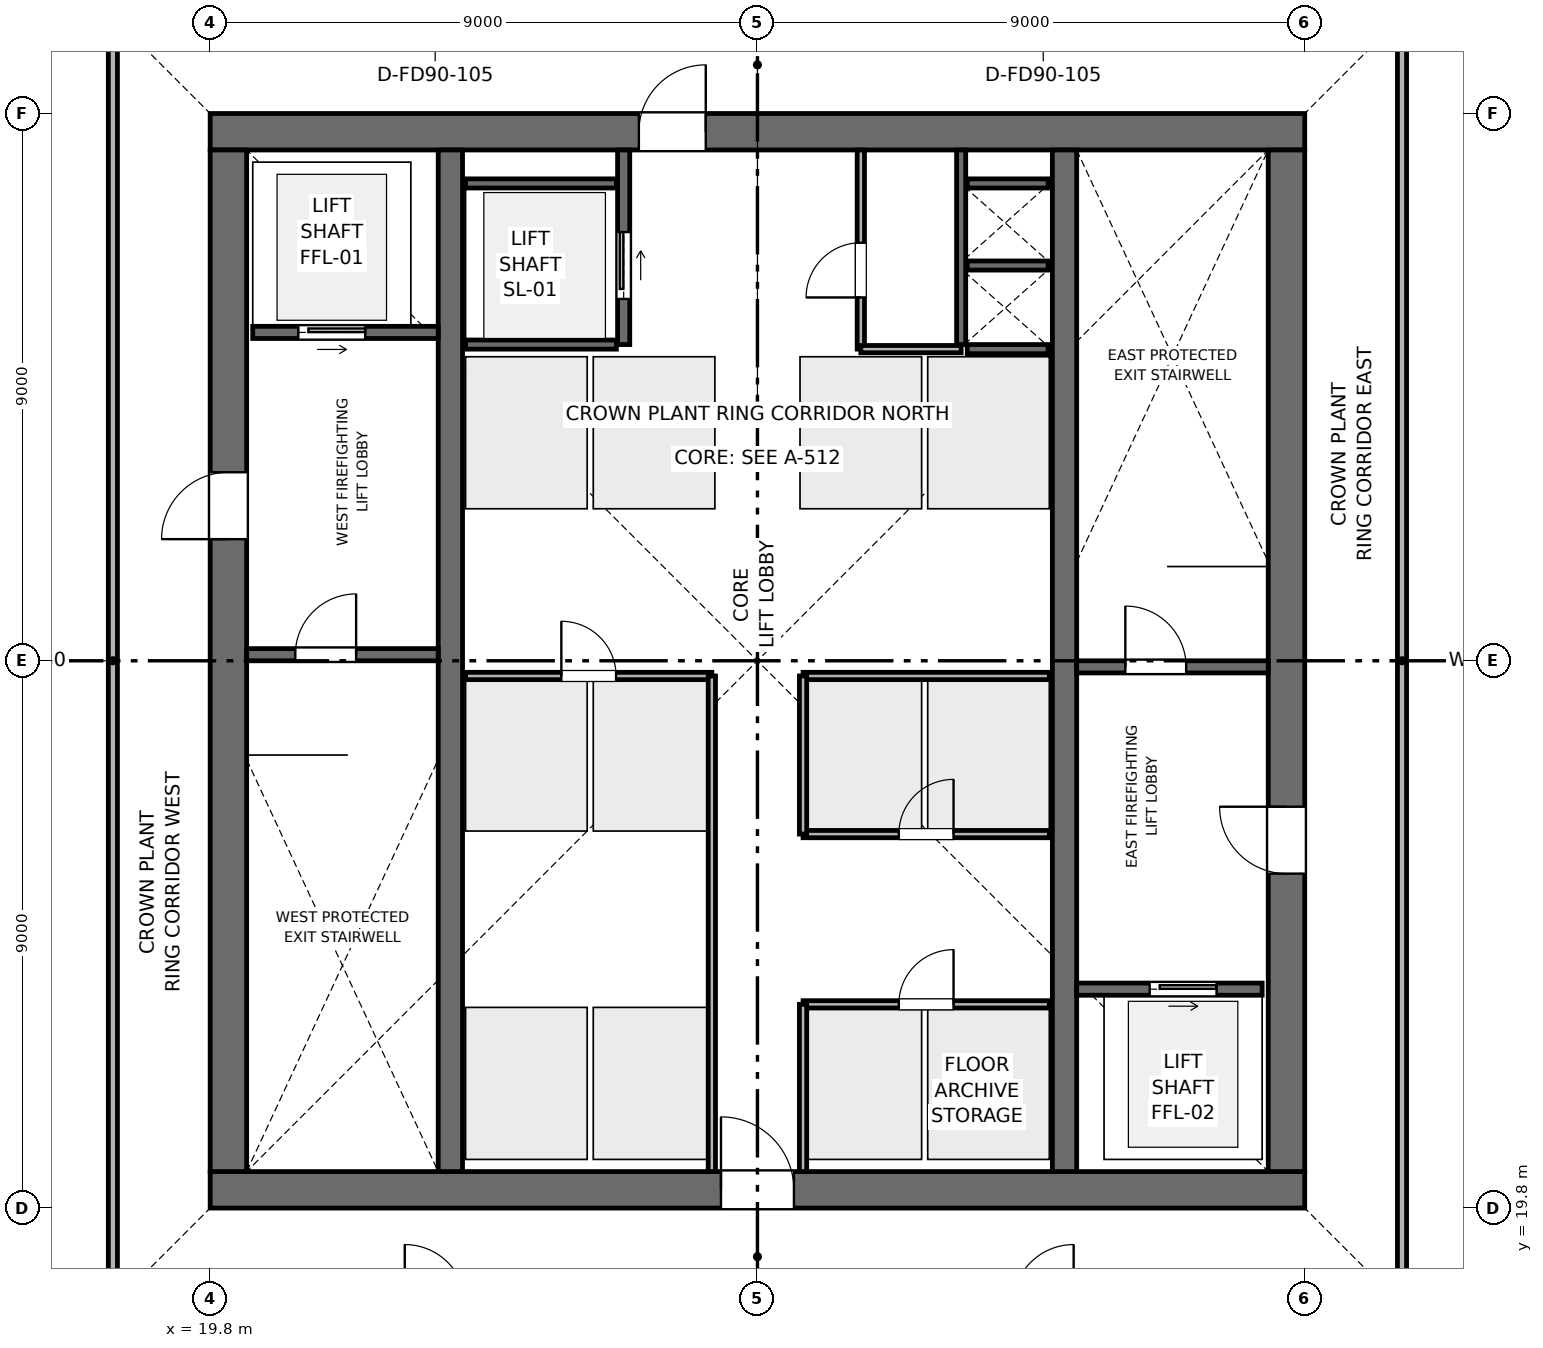
"""IFC4 building model, lengths in metres.
Left out: names, types, materials, properties, quantities, classifications, styles, units other than length and angle.
Written with IfcOpenShell. Run it as: python <this file> out.ifc"""

import sys

from ifc_helpers import new_model, si_unit, direction, frame, frame_2d, origin, place, context, subcontext, project, spatial, rectangle, extrude, element, fill, save


model = new_model("IFC4")
c1 = context("Model", 3, precision=1e-05, world=origin(), true_north=direction((0.0, 1.0)))
c2 = subcontext(c1, "Body", "Model", "MODEL_VIEW")
j1 = project(units=[si_unit("LENGTHUNIT", "METRE"), si_unit("PLANEANGLEUNIT", "RADIAN")], contexts=[c1])
p1 = place(None, origin())
s1 = spatial("IfcSite", under=j1, at=p1, CompositionType="ELEMENT")
p2 = place(p1, origin())
s2 = spatial("IfcBuilding", under=s1, at=p2, CompositionType="ELEMENT")
p3 = place(p2, frame((0.0, 0.0, 373.8)))
s3 = spatial("IfcBuildingStorey", under=s2, at=p3, CompositionType="ELEMENT", Elevation=373.8)
p4 = place(p3, frame((19.8, 20.1, 0.0), z_axis=(0.0, 0.0, 1.0), x_axis=(1.0, 0.0, 0.0)))
e1 = element("IfcWall", 1, at=p4, inside=s3, PredefinedType="SHEAR", context=c2, shape_type="SweptSolid", body=[
    extrude(rectangle(XDim=18.0, YDim=0.6, at=frame_2d((9.0, 0.0))), origin(), (0.0, 0.0, 1.0), 4.8),
])
p5 = place(p4, frame((8.4, 0.0, 0.0)))
e2 = element("IfcOpeningElement", 2, at=p5, cuts=e1, PredefinedType="OPENING", context=c2, shape_type="SweptSolid", body=[
    extrude(rectangle(XDim=1.2, YDim=2.2, at=frame_2d((0.6, 1.1))), frame((0.0, 0.31, 0.0), z_axis=(0.0, -1.0, 0.0), x_axis=(1.0, 0.0, 0.0)), (0.0, 0.0, 1.0), 0.62),
])
p6 = place(p3, frame((19.8, 37.5, 0.0), z_axis=(0.0, 0.0, 1.0), x_axis=(1.0, 0.0, 0.0)))
e3 = element("IfcWall", 3, at=p6, inside=s3, PredefinedType="SHEAR", context=c2, shape_type="SweptSolid", body=[
    extrude(rectangle(XDim=18.0, YDim=0.6, at=frame_2d((9.0, 0.0))), origin(), (0.0, 0.0, 1.0), 4.8),
])
p7 = place(p6, frame((7.05, 0.0, 0.0)))
e4 = element("IfcOpeningElement", 4, at=p7, cuts=e3, PredefinedType="OPENING", context=c2, shape_type="SweptSolid", body=[
    extrude(rectangle(XDim=1.1, YDim=2.15, at=frame_2d((0.55, 1.075))), frame((0.0, 0.31, 0.0), z_axis=(0.0, -1.0, 0.0), x_axis=(1.0, 0.0, 0.0)), (0.0, 0.0, 1.0), 0.62),
])
p8 = place(p3, frame((20.1, 20.4, 0.0), z_axis=(0.0, 0.0, 1.0), x_axis=(0.0, 1.0, 0.0)))
e5 = element("IfcWall", 5, at=p8, inside=s3, PredefinedType="SHEAR", context=c2, shape_type="SweptSolid", body=[
    extrude(rectangle(XDim=16.8, YDim=0.6, at=frame_2d((8.4, 0.0))), origin(), (0.0, 0.0, 1.0), 4.8),
])
p9 = place(p8, frame((10.4, 0.0, 0.0)))
e6 = element("IfcOpeningElement", 6, at=p9, cuts=e5, PredefinedType="OPENING", context=c2, shape_type="SweptSolid", body=[
    extrude(rectangle(XDim=1.1, YDim=2.15, at=frame_2d((0.55, 1.075))), frame((0.0, 0.31, 0.0), z_axis=(0.0, -1.0, 0.0), x_axis=(1.0, 0.0, 0.0)), (0.0, 0.0, 1.0), 0.62),
])
p10 = place(p3, frame((37.5, 20.4, 0.0), z_axis=(0.0, 0.0, 1.0), x_axis=(0.0, 1.0, 0.0)))
e7 = element("IfcWall", 7, at=p10, inside=s3, PredefinedType="SHEAR", context=c2, shape_type="SweptSolid", body=[
    extrude(rectangle(XDim=16.8, YDim=0.6, at=frame_2d((8.4, 0.0))), origin(), (0.0, 0.0, 1.0), 4.8),
])
p11 = place(p10, frame((4.9, 0.0, 0.0)))
e8 = element("IfcOpeningElement", 8, at=p11, cuts=e7, PredefinedType="OPENING", context=c2, shape_type="SweptSolid", body=[
    extrude(rectangle(XDim=1.1, YDim=2.15, at=frame_2d((0.55, 1.075))), frame((0.0, 0.31, 0.0), z_axis=(0.0, -1.0, 0.0), x_axis=(1.0, 0.0, 0.0)), (0.0, 0.0, 1.0), 0.62),
])
for number, where, z_axis, x_axis in (
    (9, (23.75, 20.4, 0.0), (0.0, 0.0, 1.0), (0.0, 1.0, 0.0)),
    (10, (33.85, 20.4, 0.0), (0.0, 0.0, 1.0), (0.0, 1.0, 0.0)),
):
    element("IfcWall", number, at=place(p3, frame(where, z_axis=z_axis, x_axis=x_axis)), inside=s3, PredefinedType="SHEAR", context=c2, shape_type="SweptSolid", body=[
        extrude(rectangle(XDim=16.8, YDim=0.4, at=frame_2d((8.4, 0.0))), origin(), (0.0, 0.0, 1.0), 4.8),
    ])
p12 = place(p3, frame((20.4, 28.9, 0.0), z_axis=(0.0, 0.0, 1.0), x_axis=(1.0, 0.0, 0.0)))
e11 = element("IfcWall", 11, at=p12, inside=s3, PredefinedType="SHEAR", context=c2, shape_type="SweptSolid", body=[
    extrude(rectangle(XDim=3.15, YDim=0.2, at=frame_2d((1.575, 0.0))), origin(), (0.0, 0.0, 1.0), 4.5),
])
p13 = place(p12, frame((0.8, 0.0, 0.0)))
e12 = element("IfcOpeningElement", 12, at=p13, cuts=e11, PredefinedType="OPENING", context=c2, shape_type="SweptSolid", body=[
    extrude(rectangle(XDim=1.0, YDim=2.1, at=frame_2d((0.5, 1.05))), frame((0.0, 0.11, 0.0), z_axis=(0.0, -1.0, 0.0), x_axis=(1.0, 0.0, 0.0)), (0.0, 0.0, 1.0), 0.22),
])
p14 = place(p3, frame((34.05, 28.7, 0.0), z_axis=(0.0, 0.0, 1.0), x_axis=(1.0, 0.0, 0.0)))
e13 = element("IfcWall", 13, at=p14, inside=s3, PredefinedType="SHEAR", context=c2, shape_type="SweptSolid", body=[
    extrude(rectangle(XDim=3.15, YDim=0.2, at=frame_2d((1.575, 0.0))), origin(), (0.0, 0.0, 1.0), 4.5),
])
p15 = place(p14, frame((0.8, 0.0, 0.0)))
e14 = element("IfcOpeningElement", 14, at=p15, cuts=e13, PredefinedType="OPENING", context=c2, shape_type="SweptSolid", body=[
    extrude(rectangle(XDim=1.0, YDim=2.1, at=frame_2d((0.5, 1.05))), frame((0.0, 0.11, 0.0), z_axis=(0.0, -1.0, 0.0), x_axis=(1.0, 0.0, 0.0)), (0.0, 0.0, 1.0), 0.22),
])
p16 = place(p3, frame((32.15, 34.0, 0.0), z_axis=(0.0, 0.0, 1.0), x_axis=(0.0, 1.0, 0.0)))
e15 = element("IfcWall", 15, at=p16, inside=s3, PredefinedType="SHEAR", context=c2, shape_type="SweptSolid", body=[
    extrude(rectangle(XDim=3.2, YDim=0.15, at=frame_2d((1.6, 0.0))), origin(), (0.0, 0.0, 1.0), 4.5),
])
for number, where, z_axis, x_axis in (
    (16, (32.25, 33.925, 0.0), (0.0, 0.0, 1.0), (1.0, 0.0, 0.0)),
    (17, (32.25, 35.3, 0.0), (0.0, 0.0, 1.0), (1.0, 0.0, 0.0)),
):
    element("IfcWall", number, at=place(p3, frame(where, z_axis=z_axis, x_axis=x_axis)), inside=s3, PredefinedType="SHEAR", context=c2, shape_type="SweptSolid", body=[
        extrude(rectangle(XDim=1.33, YDim=0.15, at=frame_2d((0.665, 0.0))), origin(), (0.0, 0.0, 1.0), 4.5),
    ])
p17 = place(p3, frame((20.5, 34.2, 0.0), z_axis=(0.0, 0.0, 1.0), x_axis=(1.0, 0.0, 0.0)))
e18 = element("IfcWall", 18, at=p17, inside=s3, PredefinedType="SHEAR", context=c2, shape_type="SweptSolid", body=[
    extrude(rectangle(XDim=3.05, YDim=0.2, at=frame_2d((1.525, 0.0))), origin(), (0.0, 0.0, 1.0), 4.5),
])
p18 = place(p17, frame((0.75, 0.0, 0.0)))
e19 = element("IfcOpeningElement", 19, at=p18, cuts=e18, PredefinedType="OPENING", context=c2, shape_type="SweptSolid", body=[
    extrude(rectangle(XDim=1.1, YDim=2.15, at=frame_2d((0.55, 1.075))), frame((0.0, 0.11, 0.0), z_axis=(0.0, -1.0, 0.0), x_axis=(1.0, 0.0, 0.0)), (0.0, 0.0, 1.0), 0.22),
])
p19 = place(p3, frame((34.05, 23.4, 0.0), z_axis=(0.0, 0.0, 1.0), x_axis=(1.0, 0.0, 0.0)))
e20 = element("IfcWall", 20, at=p19, inside=s3, PredefinedType="SHEAR", context=c2, shape_type="SweptSolid", body=[
    extrude(rectangle(XDim=3.05, YDim=0.2, at=frame_2d((1.525, 0.0))), origin(), (0.0, 0.0, 1.0), 4.5),
])
p20 = place(p19, frame((1.2, 0.0, 0.0)))
e21 = element("IfcOpeningElement", 21, at=p20, cuts=e20, PredefinedType="OPENING", context=c2, shape_type="SweptSolid", body=[
    extrude(rectangle(XDim=1.1, YDim=2.15, at=frame_2d((0.55, 1.075))), frame((0.0, 0.11, 0.0), z_axis=(0.0, -1.0, 0.0), x_axis=(1.0, 0.0, 0.0)), (0.0, 0.0, 1.0), 0.22),
])
p21 = place(p3, frame((26.6, 34.0, 0.0), z_axis=(0.0, 0.0, 1.0), x_axis=(0.0, 1.0, 0.0)))
e22 = element("IfcWall", 22, at=p21, inside=s3, PredefinedType="SHEAR", context=c2, shape_type="SweptSolid", body=[
    extrude(rectangle(XDim=3.2, YDim=0.2, at=frame_2d((1.6, 0.0))), origin(), (0.0, 0.0, 1.0), 4.5),
])
p22 = place(p21, frame((0.75, 0.0, 0.0)))
e23 = element("IfcOpeningElement", 23, at=p22, cuts=e22, PredefinedType="OPENING", context=c2, shape_type="SweptSolid", body=[
    extrude(rectangle(XDim=1.1, YDim=2.15, at=frame_2d((0.55, 1.075))), frame((0.0, 0.11, 0.0), z_axis=(0.0, -1.0, 0.0), x_axis=(1.0, 0.0, 0.0)), (0.0, 0.0, 1.0), 0.22),
])
for number, where, z_axis, x_axis in (
    (24, (24.0, 34.0, 0.0), (0.0, 0.0, 1.0), (1.0, 0.0, 0.0)),
    (25, (24.0, 36.65, 0.0), (0.0, 0.0, 1.0), (1.0, 0.0, 0.0)),
):
    element("IfcWall", number, at=place(p3, frame(where, z_axis=z_axis, x_axis=x_axis)), inside=s3, PredefinedType="SHEAR", context=c2, shape_type="SweptSolid", body=[
        extrude(rectangle(XDim=2.48, YDim=0.15, at=frame_2d((1.24, 0.0))), origin(), (0.0, 0.0, 1.0), 4.5),
    ])
p23 = place(p3, frame((32.25, 36.65, 0.0), z_axis=(0.0, 0.0, 1.0), x_axis=(1.0, 0.0, 0.0)))
e26 = element("IfcWall", 26, at=p23, inside=s3, PredefinedType="SHEAR", context=c2, shape_type="SweptSolid", body=[
    extrude(rectangle(XDim=1.33, YDim=0.15, at=frame_2d((0.665, 0.0))), origin(), (0.0, 0.0, 1.0), 4.5),
])
p24 = place(p3, frame((30.5, 33.925, 0.0), z_axis=(0.0, 0.0, 1.0), x_axis=(0.0, 1.0, 0.0)))
e27 = element("IfcWall", 27, at=p24, inside=s3, PredefinedType="PARTITIONING", context=c2, shape_type="SweptSolid", body=[
    extrude(rectangle(XDim=3.275, YDim=0.12, at=frame_2d((1.637, 0.0))), origin(), (0.0, 0.0, 1.0), 4.5),
])
p25 = place(p24, frame((0.85, 0.0, 0.0)))
e28 = element("IfcOpeningElement", 28, at=p25, cuts=e27, PredefinedType="OPENING", context=c2, shape_type="SweptSolid", body=[
    extrude(rectangle(XDim=0.9, YDim=2.1, at=frame_2d((0.45, 1.05))), frame((0.0, 0.07, 0.0), z_axis=(0.0, -1.0, 0.0), x_axis=(1.0, 0.0, 0.0)), (0.0, 0.0, 1.0), 0.14),
])
p26 = place(p3, frame((30.5, 33.925, 0.0), z_axis=(0.0, 0.0, 1.0), x_axis=(1.0, 0.0, 0.0)))
e29 = element("IfcWall", 29, at=p26, inside=s3, PredefinedType="PARTITIONING", context=c2, shape_type="SweptSolid", body=[
    extrude(rectangle(XDim=1.65, YDim=0.12, at=frame_2d((0.825, 0.0))), origin(), (0.0, 0.0, 1.0), 4.5),
])
p27 = place(p3, frame((24.0, 28.55, 0.0), z_axis=(0.0, 0.0, 1.0), x_axis=(1.0, 0.0, 0.0)))
e30 = element("IfcWall", 30, at=p27, inside=s3, PredefinedType="PARTITIONING", context=c2, shape_type="SweptSolid", body=[
    extrude(rectangle(XDim=4.05, YDim=0.12, at=frame_2d((2.025, 0.0))), origin(), (0.0, 0.0, 1.0), 4.5),
])
p28 = place(p27, frame((1.575, 0.0, 0.0)))
e31 = element("IfcOpeningElement", 31, at=p28, cuts=e30, PredefinedType="OPENING", context=c2, shape_type="SweptSolid", body=[
    extrude(rectangle(XDim=0.9, YDim=2.1, at=frame_2d((0.45, 1.05))), frame((0.0, 0.07, 0.0), z_axis=(0.0, -1.0, 0.0), x_axis=(1.0, 0.0, 0.0)), (0.0, 0.0, 1.0), 0.14),
])
p29 = place(p3, frame((28.05, 20.4, 0.0), z_axis=(0.0, 0.0, 1.0), x_axis=(0.0, 1.0, 0.0)))
e32 = element("IfcWall", 32, at=p29, inside=s3, PredefinedType="PARTITIONING", context=c2, shape_type="SweptSolid", body=[
    extrude(rectangle(XDim=8.15, YDim=0.12, at=frame_2d((4.075, 0.0))), origin(), (0.0, 0.0, 1.0), 4.5),
])
p30 = place(p3, frame((29.55, 23.15, 0.0), z_axis=(0.0, 0.0, 1.0), x_axis=(1.0, 0.0, 0.0)))
e33 = element("IfcWall", 33, at=p30, inside=s3, PredefinedType="PARTITIONING", context=c2, shape_type="SweptSolid", body=[
    extrude(rectangle(XDim=4.05, YDim=0.12, at=frame_2d((2.025, 0.0))), origin(), (0.0, 0.0, 1.0), 4.5),
])
p31 = place(p30, frame((1.575, 0.0, 0.0)))
e34 = element("IfcOpeningElement", 34, at=p31, cuts=e33, PredefinedType="OPENING", context=c2, shape_type="SweptSolid", body=[
    extrude(rectangle(XDim=0.9, YDim=2.1, at=frame_2d((0.45, 1.05))), frame((0.0, 0.07, 0.0), z_axis=(0.0, -1.0, 0.0), x_axis=(1.0, 0.0, 0.0)), (0.0, 0.0, 1.0), 0.14),
])
p32 = place(p3, frame((29.55, 20.4, 0.0), z_axis=(0.0, 0.0, 1.0), x_axis=(0.0, 1.0, 0.0)))
e35 = element("IfcWall", 35, at=p32, inside=s3, PredefinedType="PARTITIONING", context=c2, shape_type="SweptSolid", body=[
    extrude(rectangle(XDim=2.75, YDim=0.12, at=frame_2d((1.375, 0.0))), origin(), (0.0, 0.0, 1.0), 4.5),
])
p33 = place(p3, frame((29.55, 25.95, 0.0), z_axis=(0.0, 0.0, 1.0), x_axis=(1.0, 0.0, 0.0)))
e36 = element("IfcWall", 36, at=p33, inside=s3, PredefinedType="PARTITIONING", context=c2, shape_type="SweptSolid", body=[
    extrude(rectangle(XDim=4.05, YDim=0.12, at=frame_2d((2.025, 0.0))), origin(), (0.0, 0.0, 1.0), 4.5),
])
p34 = place(p33, frame((1.575, 0.0, 0.0)))
e37 = element("IfcOpeningElement", 37, at=p34, cuts=e36, PredefinedType="OPENING", context=c2, shape_type="SweptSolid", body=[
    extrude(rectangle(XDim=0.9, YDim=2.1, at=frame_2d((0.45, 1.05))), frame((0.0, 0.07, 0.0), z_axis=(0.0, -1.0, 0.0), x_axis=(1.0, 0.0, 0.0)), (0.0, 0.0, 1.0), 0.14),
])
p35 = place(p3, frame((29.55, 28.55, 0.0), z_axis=(0.0, 0.0, 1.0), x_axis=(1.0, 0.0, 0.0)))
e38 = element("IfcWall", 38, at=p35, inside=s3, PredefinedType="PARTITIONING", context=c2, shape_type="SweptSolid", body=[
    extrude(rectangle(XDim=4.05, YDim=0.12, at=frame_2d((2.025, 0.0))), origin(), (0.0, 0.0, 1.0), 4.5),
])
p36 = place(p3, frame((29.55, 25.95, 0.0), z_axis=(0.0, 0.0, 1.0), x_axis=(0.0, 1.0, 0.0)))
e39 = element("IfcWall", 39, at=p36, inside=s3, PredefinedType="PARTITIONING", context=c2, shape_type="SweptSolid", body=[
    extrude(rectangle(XDim=2.6, YDim=0.12, at=frame_2d((1.3, 0.0))), origin(), (0.0, 0.0, 1.0), 4.5),
])
for number, where, z_axis, x_axis in (
    (40, (18.2, 18.2, 0.0), (0.0, 0.0, 1.0), (0.0, 1.0, 0.0)),
    (41, (39.4, 18.2, 0.0), (0.0, 0.0, 1.0), (0.0, 1.0, 0.0)),
):
    element("IfcWall", number, at=place(p3, frame(where, z_axis=z_axis, x_axis=x_axis)), inside=s3, PredefinedType="PARTITIONING", context=c2, shape_type="SweptSolid", body=[
        extrude(rectangle(XDim=21.2, YDim=0.15, at=frame_2d((10.6, 0.0))), origin(), (0.0, 0.0, 1.0), 4.035),
    ])
p37 = place(p13, origin())
e42 = element("IfcDoor", 42, at=p37, inside=s3, OperationType="SINGLE_SWING_RIGHT", PredefinedType="DOOR", context=c2, shape_type="SweptSolid", body=[
    extrude(rectangle(XDim=1.0, YDim=2.1, at=frame_2d((0.5, 1.05))), frame((0.0, 0.025, 0.0), z_axis=(0.0, -1.0, 0.0), x_axis=(1.0, 0.0, 0.0)), (0.0, 0.0, 1.0), 0.05),
])
fill(e12, e42)
p38 = place(p15, origin())
e43 = element("IfcDoor", 43, at=p38, inside=s3, OperationType="SINGLE_SWING_LEFT", PredefinedType="DOOR", context=c2, shape_type="SweptSolid", body=[
    extrude(rectangle(XDim=1.0, YDim=2.1, at=frame_2d((0.5, 1.05))), frame((0.0, 0.025, 0.0), z_axis=(0.0, -1.0, 0.0), x_axis=(1.0, 0.0, 0.0)), (0.0, 0.0, 1.0), 0.05),
])
fill(e14, e43)
p39 = place(p18, origin())
e44 = element("IfcDoor", 44, at=p39, inside=s3, OperationType="SLIDING_TO_RIGHT", PredefinedType="DOOR", context=c2, shape_type="SweptSolid", body=[
    extrude(rectangle(XDim=1.1, YDim=2.15, at=frame_2d((0.55, 1.075))), frame((0.0, 0.025, 0.0), z_axis=(0.0, -1.0, 0.0), x_axis=(1.0, 0.0, 0.0)), (0.0, 0.0, 1.0), 0.05),
])
fill(e19, e44)
p40 = place(p20, origin())
e45 = element("IfcDoor", 45, at=p40, inside=s3, OperationType="SLIDING_TO_RIGHT", PredefinedType="DOOR", context=c2, shape_type="SweptSolid", body=[
    extrude(rectangle(XDim=1.1, YDim=2.15, at=frame_2d((0.55, 1.075))), frame((0.0, 0.025, 0.0), z_axis=(0.0, -1.0, 0.0), x_axis=(1.0, 0.0, 0.0)), (0.0, 0.0, 1.0), 0.05),
])
fill(e21, e45)
p41 = place(p22, origin())
e46 = element("IfcDoor", 46, at=p41, inside=s3, OperationType="SLIDING_TO_RIGHT", PredefinedType="DOOR", context=c2, shape_type="SweptSolid", body=[
    extrude(rectangle(XDim=1.1, YDim=2.15, at=frame_2d((0.55, 1.075))), frame((0.0, 0.025, 0.0), z_axis=(0.0, -1.0, 0.0), x_axis=(1.0, 0.0, 0.0)), (0.0, 0.0, 1.0), 0.05),
])
fill(e23, e46)
p42 = place(p25, origin())
e47 = element("IfcDoor", 47, at=p42, inside=s3, OperationType="SINGLE_SWING_LEFT", PredefinedType="DOOR", context=c2, shape_type="SweptSolid", body=[
    extrude(rectangle(XDim=0.9, YDim=2.1, at=frame_2d((0.45, 1.05))), frame((0.0, 0.025, 0.0), z_axis=(0.0, -1.0, 0.0), x_axis=(1.0, 0.0, 0.0)), (0.0, 0.0, 1.0), 0.05),
])
fill(e28, e47)
p43 = place(p28, origin())
e48 = element("IfcDoor", 48, at=p43, inside=s3, OperationType="SINGLE_SWING_LEFT", PredefinedType="DOOR", context=c2, shape_type="SweptSolid", body=[
    extrude(rectangle(XDim=0.9, YDim=2.1, at=frame_2d((0.45, 1.05))), frame((0.0, 0.025, 0.0), z_axis=(0.0, -1.0, 0.0), x_axis=(1.0, 0.0, 0.0)), (0.0, 0.0, 1.0), 0.05),
])
fill(e31, e48)
p44 = place(p31, origin())
e49 = element("IfcDoor", 49, at=p44, inside=s3, OperationType="SINGLE_SWING_RIGHT", PredefinedType="DOOR", context=c2, shape_type="SweptSolid", body=[
    extrude(rectangle(XDim=0.9, YDim=2.1, at=frame_2d((0.45, 1.05))), frame((0.0, 0.025, 0.0), z_axis=(0.0, -1.0, 0.0), x_axis=(1.0, 0.0, 0.0)), (0.0, 0.0, 1.0), 0.05),
])
fill(e34, e49)
p45 = place(p34, origin())
e50 = element("IfcDoor", 50, at=p45, inside=s3, OperationType="SINGLE_SWING_RIGHT", PredefinedType="DOOR", context=c2, shape_type="SweptSolid", body=[
    extrude(rectangle(XDim=0.9, YDim=2.1, at=frame_2d((0.45, 1.05))), frame((0.0, 0.025, 0.0), z_axis=(0.0, -1.0, 0.0), x_axis=(1.0, 0.0, 0.0)), (0.0, 0.0, 1.0), 0.05),
])
fill(e37, e50)
p46 = place(p9, origin())
e51 = element("IfcDoor", 51, at=p46, inside=s3, OperationType="SINGLE_SWING_LEFT", PredefinedType="DOOR", context=c2, shape_type="SweptSolid", body=[
    extrude(rectangle(XDim=1.1, YDim=2.15, at=frame_2d((0.55, 1.075))), frame((0.0, 0.025, 0.0), z_axis=(0.0, -1.0, 0.0), x_axis=(1.0, 0.0, 0.0)), (0.0, 0.0, 1.0), 0.05),
])
fill(e6, e51)
p47 = place(p11, origin())
e52 = element("IfcDoor", 52, at=p47, inside=s3, OperationType="SINGLE_SWING_RIGHT", PredefinedType="DOOR", context=c2, shape_type="SweptSolid", body=[
    extrude(rectangle(XDim=1.1, YDim=2.15, at=frame_2d((0.55, 1.075))), frame((0.0, 0.025, 0.0), z_axis=(0.0, -1.0, 0.0), x_axis=(1.0, 0.0, 0.0)), (0.0, 0.0, 1.0), 0.05),
])
fill(e8, e52)
p48 = place(p5, origin())
e53 = element("IfcDoor", 53, at=p48, inside=s3, OperationType="SINGLE_SWING_LEFT", PredefinedType="DOOR", context=c2, shape_type="SweptSolid", body=[
    extrude(rectangle(XDim=1.2, YDim=2.2, at=frame_2d((0.6, 1.1))), frame((0.0, 0.025, 0.0), z_axis=(0.0, -1.0, 0.0), x_axis=(1.0, 0.0, 0.0)), (0.0, 0.0, 1.0), 0.05),
])
fill(e2, e53)
p49 = place(p7, origin())
e54 = element("IfcDoor", 54, at=p49, inside=s3, OperationType="SINGLE_SWING_RIGHT", PredefinedType="DOOR", context=c2, shape_type="SweptSolid", body=[
    extrude(rectangle(XDim=1.1, YDim=2.15, at=frame_2d((0.55, 1.075))), frame((0.0, 0.025, 0.0), z_axis=(0.0, -1.0, 0.0), x_axis=(1.0, 0.0, 0.0)), (0.0, 0.0, 1.0), 0.05),
])
fill(e4, e54)
save(model, sys.argv[1])
